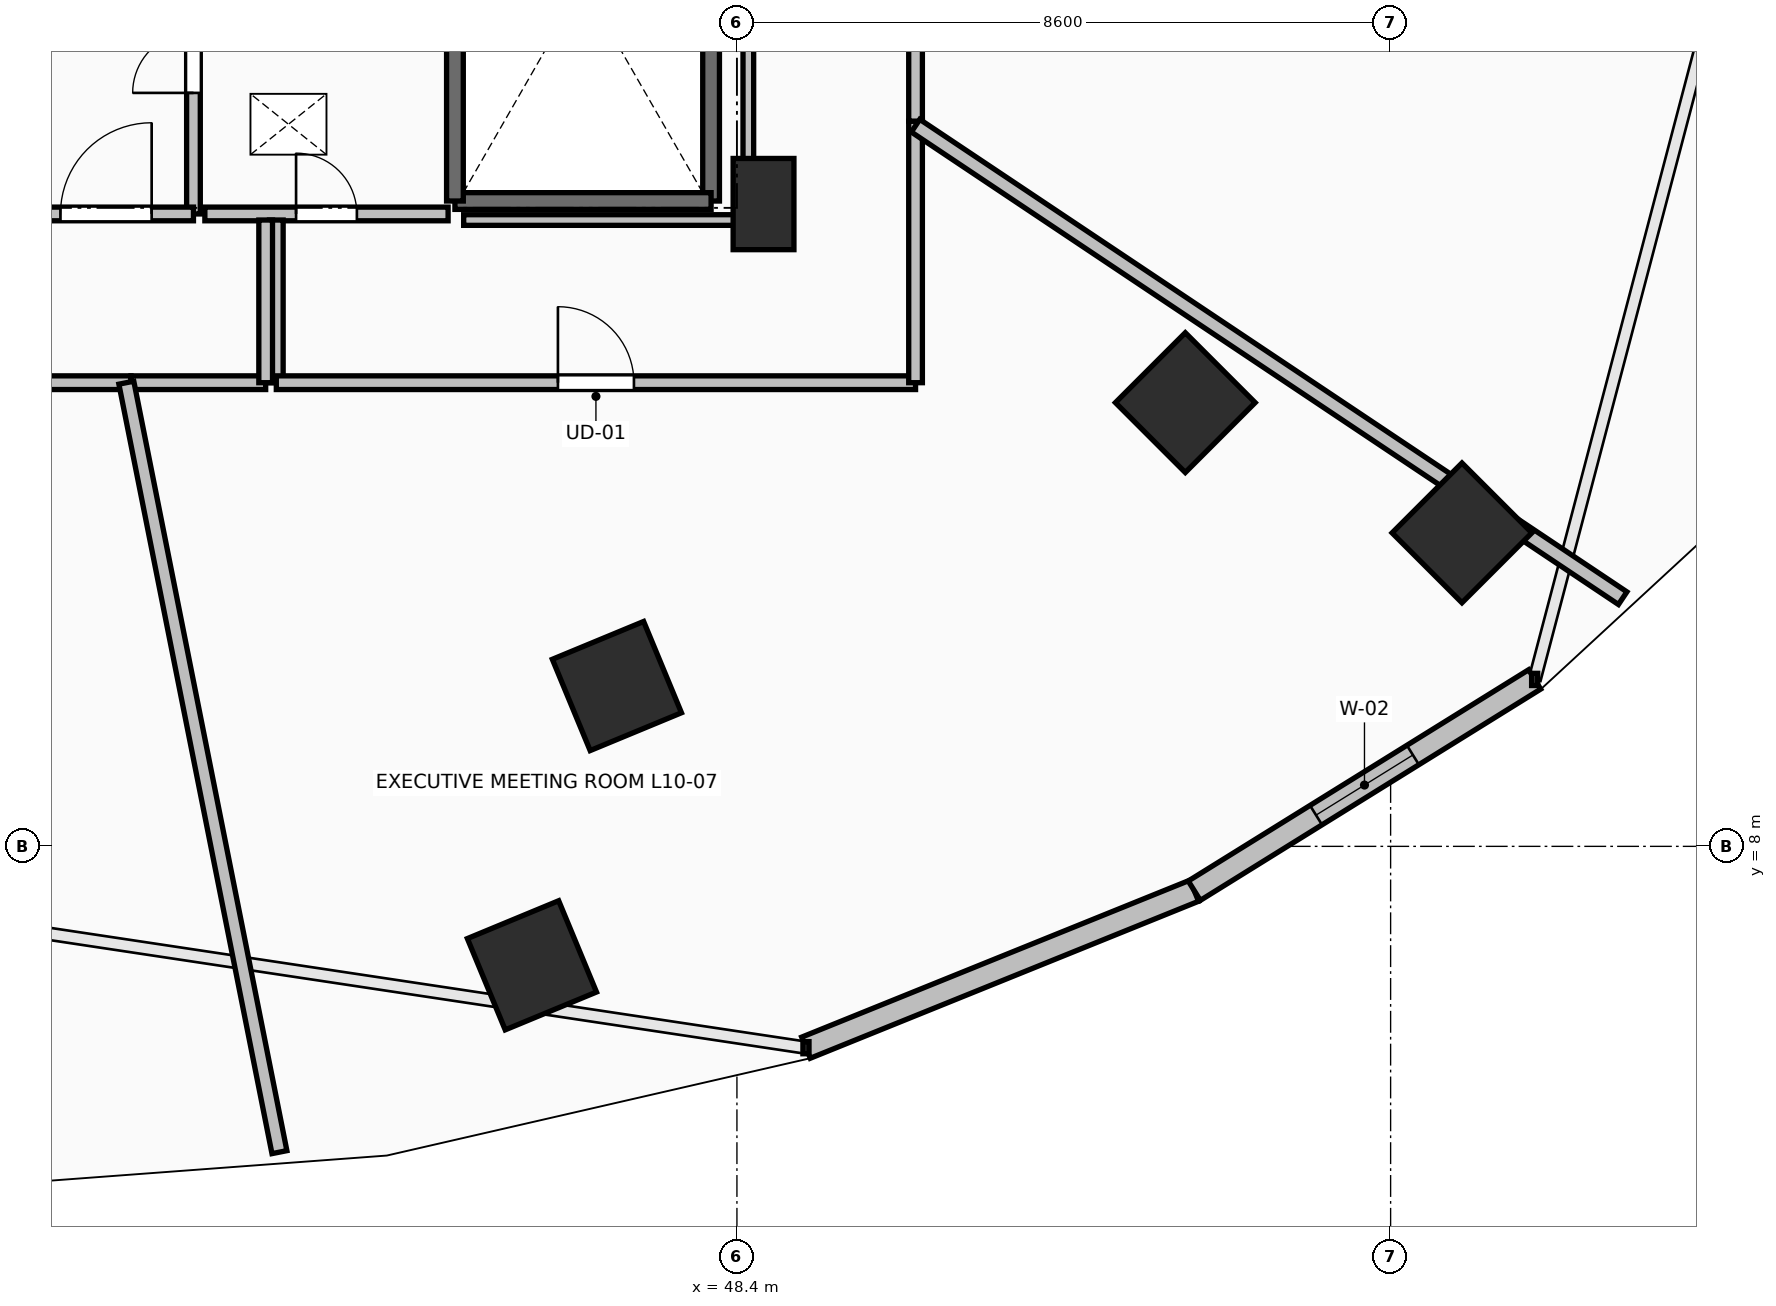
"""IFC4 building model, lengths in metres.
Left out: names, types, materials, properties, quantities, classifications, styles, units other than length and angle.
Written with IfcOpenShell. Run it as: python <this file> out.ifc"""

import sys

from ifc_helpers import new_model, si_unit, direction, frame, frame_2d, origin, origin_2d, place, context, subcontext, project, spatial, rectangle, extrude, element, fill, save


model = new_model("IFC4")
c1 = context("Model", 3, precision=1e-05, world=origin(), true_north=direction((0.0, 1.0)))
c2 = subcontext(c1, "Body", "Model", "MODEL_VIEW")
j1 = project(units=[si_unit("LENGTHUNIT", "METRE"), si_unit("PLANEANGLEUNIT", "RADIAN")], contexts=[c1])
p1 = place(None, origin())
s1 = spatial("IfcSite", under=j1, at=p1, CompositionType="ELEMENT")
p2 = place(p1, origin())
s2 = spatial("IfcBuilding", under=s1, at=p2, CompositionType="ELEMENT")
p3 = place(p2, frame((0.0, 0.0, 41.5)))
s3 = spatial("IfcBuildingStorey", under=s2, at=p3, CompositionType="ELEMENT", Elevation=41.5)
for number, where, z_axis, x_axis in (
    (1, (46.821, 10.109, 0.0), (0.0, 0.0, 1.0), (0.383, -0.924, 0.0)),
    (2, (54.299, 13.838, 0.0), (0.0, 0.0, 1.0), (0.707, -0.707, 0.0)),
    (3, (45.703, 6.435, 0.0), (0.0, 0.0, 1.0), (0.383, -0.924, 0.0)),
    (4, (57.939, 12.124, 0.0), (0.0, 0.0, 1.0), (0.707, -0.707, 0.0)),
):
    element("IfcColumn", number, at=place(p3, frame(where, z_axis=z_axis, x_axis=x_axis)), inside=s3, PredefinedType="COLUMN", context=c2, shape_type="SweptSolid", body=[
        extrude(rectangle(XDim=1.3, YDim=1.3, at=origin_2d()), origin(), (0.0, 0.0, 1.0), 3.5),
    ])
p4 = place(p3, frame((48.75, 16.45, 0.0), z_axis=(0.0, 0.0, 1.0), x_axis=(1.0, 0.0, 0.0)))
e5 = element("IfcColumn", 5, at=p4, inside=s3, PredefinedType="PILASTER", context=c2, shape_type="SweptSolid", body=[
    extrude(rectangle(XDim=0.8, YDim=1.2, at=origin_2d()), origin(), (0.0, 0.0, 1.0), 3.5),
])
p5 = place(p3, frame((49.308, 5.351, 0.0), z_axis=(0.0, 0.0, 1.0), x_axis=(0.927095325176, 0.374825636845, 0.0)))
e6 = element("IfcWall", 6, at=p5, inside=s3, PredefinedType="STANDARD", context=c2, shape_type="SweptSolid", body=[
    extrude(rectangle(XDim=5.51, YDim=0.3, at=frame_2d((2.755, 0.0))), origin(), (0.0, 0.0, 1.0), 3.24),
])
p6 = place(p3, frame((54.417, 7.417, 0.0), z_axis=(0.0, 0.0, 1.0), x_axis=(0.849633724826, 0.527373239404, 0.0)))
e7 = element("IfcWall", 7, at=p6, inside=s3, PredefinedType="STANDARD", context=c2, shape_type="SweptSolid", body=[
    extrude(rectangle(XDim=5.271, YDim=0.3, at=frame_2d((2.635, 0.0))), origin(), (0.0, 0.0, 1.0), 3.24),
])
p7 = place(p6, frame((1.885, 0.0, 0.85)))
e8 = element("IfcOpeningElement", 8, at=p7, cuts=e7, PredefinedType="OPENING", context=c2, shape_type="SweptSolid", body=[
    extrude(rectangle(XDim=1.5, YDim=2.19, at=frame_2d((0.75, 1.095))), frame((0.0, 0.165, 0.0), z_axis=(0.0, -1.0, 0.0), x_axis=(1.0, 0.0, 0.0)), (0.0, 0.0, 1.0), 0.33),
])
p8 = place(p3, frame((48.06, 23.91, 0.0), z_axis=(0.0, 0.0, 1.0), x_axis=(0.0, -1.0, 0.0)))
e9 = element("IfcWall", 9, at=p8, inside=s3, PredefinedType="SOLIDWALL", context=c2, shape_type="SweptSolid", body=[
    extrude(rectangle(XDim=7.42, YDim=0.22, at=frame_2d((3.71, 0.0))), origin(), (0.0, 0.0, 1.0), 3.24),
])
p9 = place(p3, frame((48.06, 16.49, 0.0), z_axis=(0.0, 0.0, 1.0), x_axis=(-1.0, 0.0, 0.0)))
e10 = element("IfcWall", 10, at=p9, inside=s3, PredefinedType="SOLIDWALL", context=c2, shape_type="SweptSolid", body=[
    extrude(rectangle(XDim=3.37, YDim=0.22, at=frame_2d((1.685, 0.0))), origin(), (0.0, 0.0, 1.0), 3.24),
])
p10 = place(p3, frame((44.69, 16.49, 0.0), z_axis=(0.0, 0.0, 1.0), x_axis=(0.0, 1.0, 0.0)))
e11 = element("IfcWall", 11, at=p10, inside=s3, PredefinedType="SOLIDWALL", context=c2, shape_type="SweptSolid", body=[
    extrude(rectangle(XDim=7.42, YDim=0.22, at=frame_2d((3.71, 0.0))), origin(), (0.0, 0.0, 1.0), 3.24),
])
p11 = place(p3, frame((41.25, 16.32, 0.0), z_axis=(0.0, 0.0, 1.0), x_axis=(0.0, 1.0, 0.0)))
e12 = element("IfcWall", 12, at=p11, inside=s3, PredefinedType="PARTITIONING", context=c2, shape_type="SweptSolid", body=[
    extrude(rectangle(XDim=3.985, YDim=0.18, at=frame_2d((1.992, 0.0))), origin(), (0.0, 0.0, 1.0), 3.24),
])
p12 = place(p11, frame((1.593, 0.0, 0.0)))
e13 = element("IfcOpeningElement", 13, at=p12, cuts=e12, PredefinedType="OPENING", context=c2, shape_type="SweptSolid", body=[
    extrude(rectangle(XDim=0.8, YDim=2.05, at=frame_2d((0.4, 1.025))), frame((0.0, 0.105, 0.0), z_axis=(0.0, -1.0, 0.0), x_axis=(1.0, 0.0, 0.0)), (0.0, 0.0, 1.0), 0.21),
])
p13 = place(p3, frame((38.95, 16.32, 0.0), z_axis=(0.0, 0.0, 1.0), x_axis=(1.0, 0.0, 0.0)))
e14 = element("IfcWall", 14, at=p13, inside=s3, PredefinedType="PARTITIONING", context=c2, shape_type="SweptSolid", body=[
    extrude(rectangle(XDim=2.3, YDim=0.18, at=frame_2d((1.15, 0.0))), origin(), (0.0, 0.0, 1.0), 3.24),
])
p14 = place(p13, frame((0.55, 0.0, 0.0)))
e15 = element("IfcOpeningElement", 15, at=p14, cuts=e14, PredefinedType="OPENING", context=c2, shape_type="SweptSolid", body=[
    extrude(rectangle(XDim=1.2, YDim=2.15, at=frame_2d((0.6, 1.075))), frame((0.0, 0.105, 0.0), z_axis=(0.0, -1.0, 0.0), x_axis=(1.0, 0.0, 0.0)), (0.0, 0.0, 1.0), 0.21),
])
p15 = place(p3, frame((41.4, 16.32, 0.0), z_axis=(0.0, 0.0, 1.0), x_axis=(1.0, 0.0, 0.0)))
e16 = element("IfcWall", 16, at=p15, inside=s3, PredefinedType="PARTITIONING", context=c2, shape_type="SweptSolid", body=[
    extrude(rectangle(XDim=3.2, YDim=0.18, at=frame_2d((1.6, 0.0))), origin(), (0.0, 0.0, 1.0), 3.24),
])
p16 = place(p15, frame((1.2, 0.0, 0.0)))
e17 = element("IfcOpeningElement", 17, at=p16, cuts=e16, PredefinedType="OPENING", context=c2, shape_type="SweptSolid", body=[
    extrude(rectangle(XDim=0.8, YDim=2.05, at=frame_2d((0.4, 1.025))), frame((0.0, 0.105, 0.0), z_axis=(0.0, -1.0, 0.0), x_axis=(1.0, 0.0, 0.0)), (0.0, 0.0, 1.0), 0.21),
])
p17 = place(p3, frame((30.109, 14.1, 0.0), z_axis=(0.0, 0.0, 1.0), x_axis=(1.0, 0.0, 0.0)))
e18 = element("IfcWall", 18, at=p17, inside=s3, PredefinedType="PARTITIONING", context=c2, shape_type="SweptSolid", body=[
    extrude(rectangle(XDim=10.319, YDim=0.18, at=frame_2d((5.16, 0.0))), origin(), (0.0, 0.0, 1.0), 3.24),
])
p18 = place(p17, frame((4.659, 0.0, 0.0)))
e19 = element("IfcOpeningElement", 19, at=p18, cuts=e18, PredefinedType="OPENING", context=c2, shape_type="SweptSolid", body=[
    extrude(rectangle(XDim=1.0, YDim=2.15, at=frame_2d((0.5, 1.075))), frame((0.0, 0.105, 0.0), z_axis=(0.0, -1.0, 0.0), x_axis=(1.0, 0.0, 0.0)), (0.0, 0.0, 1.0), 0.21),
])
p19 = place(p3, frame((42.34, 16.24, 0.0), z_axis=(0.0, 0.0, 1.0), x_axis=(0.0, -1.0, 0.0)))
e20 = element("IfcWall", 20, at=p19, inside=s3, PredefinedType="PARTITIONING", context=c2, shape_type="SweptSolid", body=[
    extrude(rectangle(XDim=2.14, YDim=0.18, at=frame_2d((1.07, 0.0))), origin(), (0.0, 0.0, 1.0), 3.24),
])
p20 = place(p3, frame((42.34, 14.1, 0.0), z_axis=(0.0, 0.0, 1.0), x_axis=(1.0, 0.0, 0.0)))
e21 = element("IfcWall", 21, at=p20, inside=s3, PredefinedType="PARTITIONING", context=c2, shape_type="SweptSolid", body=[
    extrude(rectangle(XDim=8.41, YDim=0.18, at=frame_2d((4.205, 0.0))), origin(), (0.0, 0.0, 1.0), 2.432),
])
p21 = place(p20, frame((3.705, 0.0, 0.0)))
e22 = element("IfcOpeningElement", 22, at=p21, cuts=e21, PredefinedType="OPENING", context=c2, shape_type="SweptSolid", body=[
    extrude(rectangle(XDim=1.0, YDim=2.15, at=frame_2d((0.5, 1.075))), frame((0.0, 0.105, 0.0), z_axis=(0.0, -1.0, 0.0), x_axis=(1.0, 0.0, 0.0)), (0.0, 0.0, 1.0), 0.21),
])
p22 = place(p3, frame((50.75, 14.1, 0.0), z_axis=(0.0, 0.0, 1.0), x_axis=(0.0, 1.0, 0.0)))
e23 = element("IfcWall", 23, at=p22, inside=s3, PredefinedType="PARTITIONING", context=c2, shape_type="SweptSolid", body=[
    extrude(rectangle(XDim=3.441, YDim=0.18, at=frame_2d((1.72, 0.0))), origin(), (0.0, 0.0, 1.0), 2.432),
])
p23 = place(p3, frame((40.428, 14.1, 0.0), z_axis=(0.0, 0.0, 1.0), x_axis=(1.0, 0.0, 0.0)))
e24 = element("IfcWall", 24, at=p23, inside=s3, PredefinedType="PARTITIONING", context=c2, shape_type="SweptSolid", body=[
    extrude(rectangle(XDim=1.772, YDim=0.18, at=frame_2d((0.886, 0.0))), origin(), (0.0, 0.0, 1.0), 3.24),
])
p24 = place(p3, frame((42.2, 14.1, 0.0), z_axis=(0.0, 0.0, 1.0), x_axis=(0.0, 1.0, 0.0)))
e25 = element("IfcWall", 25, at=p24, inside=s3, PredefinedType="PARTITIONING", context=c2, shape_type="SweptSolid", body=[
    extrude(rectangle(XDim=2.14, YDim=0.18, at=frame_2d((1.07, 0.0))), origin(), (0.0, 0.0, 1.0), 3.24),
])
p25 = place(p3, frame((50.75, 17.541, 0.0), z_axis=(0.0, 0.0, 1.0), x_axis=(0.0, 1.0, 0.0)))
e26 = element("IfcWall", 26, at=p25, inside=s3, PredefinedType="PARTITIONING", context=c2, shape_type="SweptSolid", body=[
    extrude(rectangle(XDim=10.795, YDim=0.18, at=frame_2d((5.397, 0.0))), origin(), (0.0, 0.0, 1.0), 2.432),
])
p26 = place(p25, frame((4.897, 0.0, 0.0)))
e27 = element("IfcOpeningElement", 27, at=p26, cuts=e26, PredefinedType="OPENING", context=c2, shape_type="SweptSolid", body=[
    extrude(rectangle(XDim=1.0, YDim=2.15, at=frame_2d((0.5, 1.075))), frame((0.0, 0.105, 0.0), z_axis=(0.0, -1.0, 0.0), x_axis=(1.0, 0.0, 0.0)), (0.0, 0.0, 1.0), 0.21),
])
p27 = place(p3, frame((42.381, 3.977, 0.0), z_axis=(0.0, 0.0, 1.0), x_axis=(-0.195142599893, 0.980774880239, 0.0)))
e28 = element("IfcWall", 28, at=p27, inside=s3, PredefinedType="PARTITIONING", context=c2, shape_type="SweptSolid", body=[
    extrude(rectangle(XDim=10.322, YDim=0.2, at=frame_2d((5.161, 0.0))), origin(), (0.0, 0.0, 1.0), 2.432),
])
p28 = place(p3, frame((60.053, 11.265, 0.0), z_axis=(0.0, 0.0, 1.0), x_axis=(-0.831469078055, 0.555571032577, 0.0)))
e29 = element("IfcWall", 29, at=p28, inside=s3, PredefinedType="PARTITIONING", context=c2, shape_type="SweptSolid", body=[
    extrude(rectangle(XDim=11.189, YDim=0.2, at=frame_2d((5.594, 0.0))), origin(), (0.0, 0.0, 1.0), 2.624),
])
p29 = place(p3, frame((48.55, 23.754, 0.0), z_axis=(0.0, 0.0, 1.0), x_axis=(0.0, -1.0, 0.0)))
e30 = element("IfcWall", 30, at=p29, inside=s3, PredefinedType="PARTITIONING", context=c2, shape_type="SweptSolid", body=[
    extrude(rectangle(XDim=7.514, YDim=0.14, at=frame_2d((3.757, 0.0))), origin(), (0.0, 0.0, 1.0), 2.432),
])
p30 = place(p3, frame((48.55, 16.24, 0.0), z_axis=(0.0, 0.0, 1.0), x_axis=(-1.0, 0.0, 0.0)))
e31 = element("IfcWall", 31, at=p30, inside=s3, PredefinedType="PARTITIONING", context=c2, shape_type="SweptSolid", body=[
    extrude(rectangle(XDim=3.745, YDim=0.14, at=frame_2d((1.873, 0.0))), origin(), (0.0, 0.0, 1.0), 2.432),
])
p31 = place(p7, origin())
e32 = element("IfcWindow", 32, at=p31, inside=s3, PartitioningType="SINGLE_PANEL", PredefinedType="WINDOW", context=c2, shape_type="SweptSolid", body=[
    extrude(rectangle(XDim=1.5, YDim=2.19, at=frame_2d((0.75, 1.095))), frame((0.0, 0.03, 0.0), z_axis=(0.0, -1.0, 0.0), x_axis=(1.0, 0.0, 0.0)), (0.0, 0.0, 1.0), 0.06),
])
fill(e8, e32)
p32 = place(p12, origin())
e33 = element("IfcDoor", 33, at=p32, inside=s3, OperationType="SINGLE_SWING_LEFT", PredefinedType="DOOR", context=c2, shape_type="SweptSolid", body=[
    extrude(rectangle(XDim=0.8, YDim=2.05, at=frame_2d((0.4, 1.025))), frame((0.0, 0.025, 0.0), z_axis=(0.0, -1.0, 0.0), x_axis=(1.0, 0.0, 0.0)), (0.0, 0.0, 1.0), 0.05),
])
fill(e13, e33)
p33 = place(p14, origin())
e34 = element("IfcDoor", 34, at=p33, inside=s3, OperationType="SINGLE_SWING_RIGHT", PredefinedType="DOOR", context=c2, shape_type="SweptSolid", body=[
    extrude(rectangle(XDim=1.2, YDim=2.15, at=frame_2d((0.6, 1.075))), frame((0.0, 0.025, 0.0), z_axis=(0.0, -1.0, 0.0), x_axis=(1.0, 0.0, 0.0)), (0.0, 0.0, 1.0), 0.05),
])
fill(e15, e34)
p34 = place(p16, origin())
e35 = element("IfcDoor", 35, at=p34, inside=s3, OperationType="SINGLE_SWING_LEFT", PredefinedType="DOOR", context=c2, shape_type="SweptSolid", body=[
    extrude(rectangle(XDim=0.8, YDim=2.05, at=frame_2d((0.4, 1.025))), frame((0.0, 0.025, 0.0), z_axis=(0.0, -1.0, 0.0), x_axis=(1.0, 0.0, 0.0)), (0.0, 0.0, 1.0), 0.05),
])
fill(e17, e35)
p35 = place(p21, origin())
e36 = element("IfcDoor", 36, at=p35, inside=s3, OperationType="SINGLE_SWING_LEFT", PredefinedType="DOOR", context=c2, shape_type="SweptSolid", body=[
    extrude(rectangle(XDim=1.0, YDim=2.15, at=frame_2d((0.5, 1.075))), frame((0.0, 0.025, 0.0), z_axis=(0.0, -1.0, 0.0), x_axis=(1.0, 0.0, 0.0)), (0.0, 0.0, 1.0), 0.05),
])
fill(e22, e36)
save(model, sys.argv[1])
